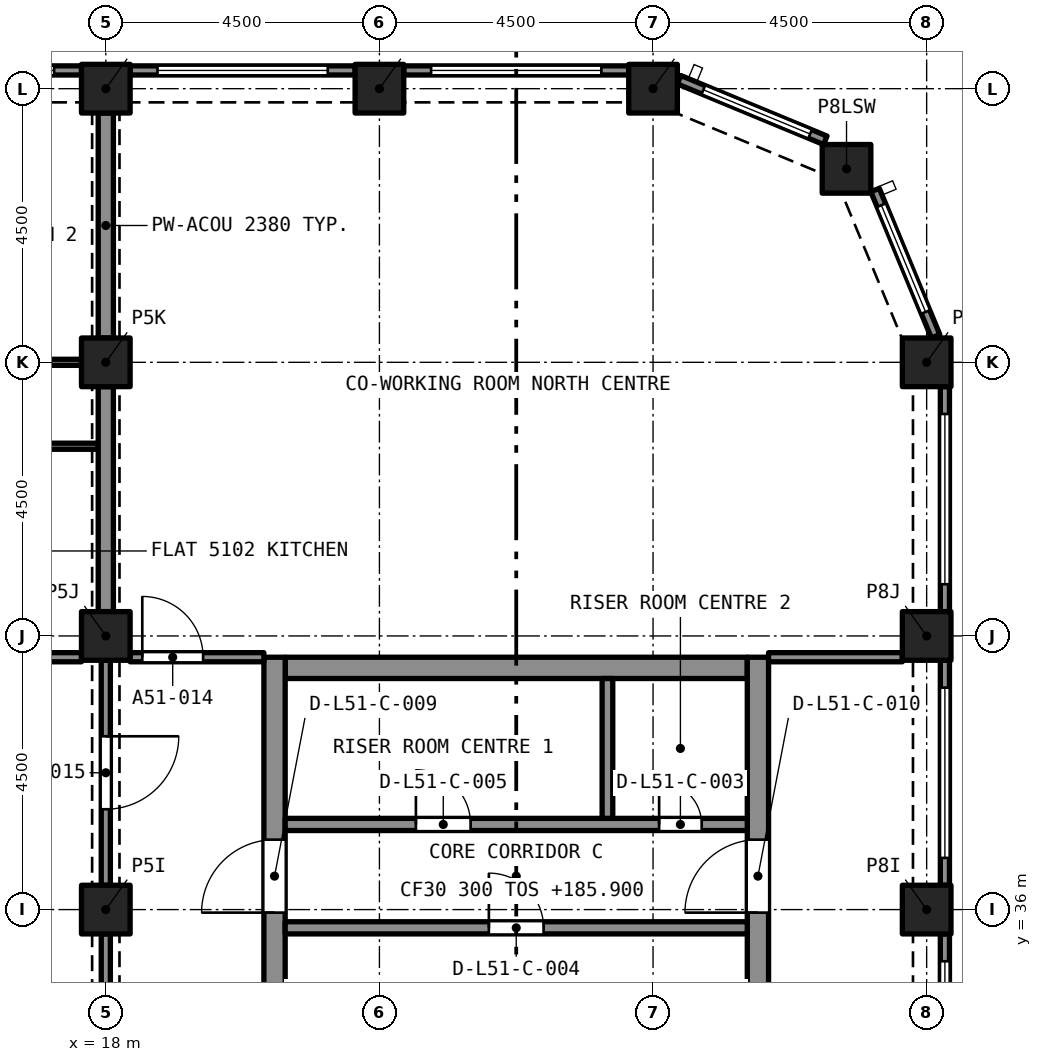
"""IFC4 building model, lengths in metres.
Left out: names, types, materials, properties, quantities, classifications, styles, units other than length and angle.
Written with IfcOpenShell. Run it as: python <this file> out.ifc"""

import sys

from ifc_helpers import new_model, si_unit, direction, frame, frame_2d, origin, origin_2d, place, context, subcontext, project, spatial, rectangle, extrude, element, fill, save


model = new_model("IFC4")
c1 = context("Model", 3, precision=1e-05, world=origin(), true_north=direction((0.0, 1.0)))
c2 = subcontext(c1, "Body", "Model", "MODEL_VIEW")
j1 = project(units=[si_unit("LENGTHUNIT", "METRE"), si_unit("PLANEANGLEUNIT", "RADIAN")], contexts=[c1])
p1 = place(None, origin())
s1 = spatial("IfcSite", under=j1, at=p1, CompositionType="ELEMENT")
p2 = place(p1, origin())
s2 = spatial("IfcBuilding", under=s1, at=p2, CompositionType="ELEMENT")
p3 = place(p2, frame((0.0, 0.0, 185.9)))
s3 = spatial("IfcBuildingStorey", under=s2, at=p3, CompositionType="ELEMENT", Elevation=185.9)
for number, where, z_axis, x_axis in (
    (1, (18.0, 36.0, 0.0), (0.0, 0.0, 1.0), (1.0, 0.0, 0.0)),
    (2, (31.5, 36.0, 0.0), (0.0, 0.0, 1.0), (1.0, 0.0, 0.0)),
    (3, (18.0, 40.5, 0.0), (0.0, 0.0, 1.0), (1.0, 0.0, 0.0)),
    (4, (31.5, 40.5, 0.0), (0.0, 0.0, 1.0), (1.0, 0.0, 0.0)),
    (5, (18.0, 45.0, 0.0), (0.0, 0.0, 1.0), (1.0, 0.0, 0.0)),
    (6, (31.5, 45.0, 0.0), (0.0, 0.0, 1.0), (1.0, 0.0, 0.0)),
    (7, (30.182, 48.182, 0.0), (0.0, 0.0, 1.0), (1.0, 0.0, 0.0)),
    (8, (18.0, 49.5, 0.0), (0.0, 0.0, 1.0), (1.0, 0.0, 0.0)),
    (9, (22.5, 49.5, 0.0), (0.0, 0.0, 1.0), (1.0, 0.0, 0.0)),
    (10, (27.0, 49.5, 0.0), (0.0, 0.0, 1.0), (1.0, 0.0, 0.0)),
):
    element("IfcColumn", number, at=place(p3, frame(where, z_axis=z_axis, x_axis=x_axis)), inside=s3, PredefinedType="COLUMN", context=c2, shape_type="SweptSolid", body=[
        extrude(rectangle(XDim=0.8, YDim=0.8, at=origin_2d()), origin(), (0.0, 0.0, 1.0), 3.2),
    ])
p4 = place(p3, frame((20.95, 39.975, 0.0), z_axis=(0.0, 0.0, 1.0), x_axis=(1.0, 0.0, 0.0)))
e11 = element("IfcWall", 11, at=p4, inside=s3, PredefinedType="SOLIDWALL", context=c2, shape_type="SweptSolid", body=[
    extrude(rectangle(XDim=7.6, YDim=0.35, at=frame_2d((3.8, 0.0))), origin(), (0.0, 0.0, 1.0), 3.2),
])
p5 = place(p3, frame((20.775, 27.35, 0.0), z_axis=(0.0, 0.0, 1.0), x_axis=(0.0, 1.0, 0.0)))
e12 = element("IfcWall", 12, at=p5, inside=s3, PredefinedType="SOLIDWALL", context=c2, shape_type="SweptSolid", body=[
    extrude(rectangle(XDim=12.8, YDim=0.35, at=frame_2d((6.4, 0.0))), origin(), (0.0, 0.0, 1.0), 3.2),
])
p6 = place(p5, frame((8.6, 0.0, 0.0)))
e13 = element("IfcOpeningElement", 13, at=p6, cuts=e12, PredefinedType="OPENING", context=c2, shape_type="SweptSolid", body=[
    extrude(rectangle(XDim=1.2, YDim=2.1, at=frame_2d((0.6, 1.05))), frame((0.0, 0.185, 0.0), z_axis=(0.0, -1.0, 0.0), x_axis=(1.0, 0.0, 0.0)), (0.0, 0.0, 1.0), 0.37),
])
p7 = place(p3, frame((28.725, 27.35, 0.0), z_axis=(0.0, 0.0, 1.0), x_axis=(0.0, 1.0, 0.0)))
e14 = element("IfcWall", 14, at=p7, inside=s3, PredefinedType="SOLIDWALL", context=c2, shape_type="SweptSolid", body=[
    extrude(rectangle(XDim=12.8, YDim=0.35, at=frame_2d((6.4, 0.0))), origin(), (0.0, 0.0, 1.0), 3.2),
])
p8 = place(p7, frame((8.6, 0.0, 0.0)))
e15 = element("IfcOpeningElement", 15, at=p8, cuts=e14, PredefinedType="OPENING", context=c2, shape_type="SweptSolid", body=[
    extrude(rectangle(XDim=1.2, YDim=2.1, at=frame_2d((0.6, 1.05))), frame((0.0, 0.185, 0.0), z_axis=(0.0, -1.0, 0.0), x_axis=(1.0, 0.0, 0.0)), (0.0, 0.0, 1.0), 0.37),
])
p9 = place(p3, frame((31.8, 35.6, 0.0), z_axis=(0.0, 0.0, 1.0), x_axis=(0.0, -1.0, 0.0)))
e16 = element("IfcWall", 16, at=p9, inside=s3, PredefinedType="SOLIDWALL", context=c2, shape_type="SweptSolid", body=[
    extrude(rectangle(XDim=3.7, YDim=0.15, at=frame_2d((1.85, 0.0))), origin(), (0.0, 0.0, 1.0), 3.2),
])
p10 = place(p9, frame((0.45, 0.0, 0.45)))
e17 = element("IfcOpeningElement", 17, at=p10, cuts=e16, PredefinedType="OPENING", context=c2, shape_type="SweptSolid", body=[
    extrude(rectangle(XDim=2.8, YDim=1.95, at=frame_2d((1.4, 0.975))), frame((0.0, 0.085, 0.0), z_axis=(0.0, -1.0, 0.0), x_axis=(1.0, 0.0, 0.0)), (0.0, 0.0, 1.0), 0.17),
])
p11 = place(p3, frame((31.8, 40.1, 0.0), z_axis=(0.0, 0.0, 1.0), x_axis=(0.0, -1.0, 0.0)))
e18 = element("IfcWall", 18, at=p11, inside=s3, PredefinedType="SOLIDWALL", context=c2, shape_type="SweptSolid", body=[
    extrude(rectangle(XDim=3.7, YDim=0.15, at=frame_2d((1.85, 0.0))), origin(), (0.0, 0.0, 1.0), 3.2),
])
p12 = place(p11, frame((0.45, 0.0, 0.45)))
e19 = element("IfcOpeningElement", 19, at=p12, cuts=e18, PredefinedType="OPENING", context=c2, shape_type="SweptSolid", body=[
    extrude(rectangle(XDim=2.8, YDim=1.95, at=frame_2d((1.4, 0.975))), frame((0.0, 0.085, 0.0), z_axis=(0.0, -1.0, 0.0), x_axis=(1.0, 0.0, 0.0)), (0.0, 0.0, 1.0), 0.17),
])
p13 = place(p3, frame((31.8, 44.6, 0.0), z_axis=(0.0, 0.0, 1.0), x_axis=(0.0, -1.0, 0.0)))
e20 = element("IfcWall", 20, at=p13, inside=s3, PredefinedType="SOLIDWALL", context=c2, shape_type="SweptSolid", body=[
    extrude(rectangle(XDim=3.7, YDim=0.15, at=frame_2d((1.85, 0.0))), origin(), (0.0, 0.0, 1.0), 3.2),
])
p14 = place(p13, frame((0.45, 0.0, 0.45)))
e21 = element("IfcOpeningElement", 21, at=p14, cuts=e20, PredefinedType="OPENING", context=c2, shape_type="SweptSolid", body=[
    extrude(rectangle(XDim=2.8, YDim=1.95, at=frame_2d((1.4, 0.975))), frame((0.0, 0.085, 0.0), z_axis=(0.0, -1.0, 0.0), x_axis=(1.0, 0.0, 0.0)), (0.0, 0.0, 1.0), 0.17),
])
p15 = place(p3, frame((30.651, 47.833, 0.0), z_axis=(0.0, 0.0, 1.0), x_axis=(0.382669406082, -0.923885342263, 0.0)))
e22 = element("IfcWall", 22, at=p15, inside=s3, PredefinedType="SOLIDWALL", context=c2, shape_type="SweptSolid", body=[
    extrude(rectangle(XDim=2.602, YDim=0.15, at=frame_2d((1.301, 0.0))), origin(), (0.0, 0.0, 1.0), 3.2),
])
p16 = place(p15, frame((0.27, 0.0, 0.45)))
e23 = element("IfcOpeningElement", 23, at=p16, cuts=e22, PredefinedType="OPENING", context=c2, shape_type="SweptSolid", body=[
    extrude(rectangle(XDim=1.9, YDim=1.95, at=frame_2d((0.95, 0.975))), frame((0.0, 0.085, 0.0), z_axis=(0.0, -1.0, 0.0), x_axis=(1.0, 0.0, 0.0)), (0.0, 0.0, 1.0), 0.17),
])
p17 = place(p3, frame((27.429, 49.647, 0.0), z_axis=(0.0, 0.0, 1.0), x_axis=(0.923885342263, -0.382669406082, 0.0)))
e24 = element("IfcWall", 24, at=p17, inside=s3, PredefinedType="SOLIDWALL", context=c2, shape_type="SweptSolid", body=[
    extrude(rectangle(XDim=2.602, YDim=0.15, at=frame_2d((1.301, 0.0))), origin(), (0.0, 0.0, 1.0), 3.2),
])
p18 = place(p17, frame((0.432, 0.0, 0.45)))
e25 = element("IfcOpeningElement", 25, at=p18, cuts=e24, PredefinedType="OPENING", context=c2, shape_type="SweptSolid", body=[
    extrude(rectangle(XDim=1.9, YDim=1.95, at=frame_2d((0.95, 0.975))), frame((0.0, 0.085, 0.0), z_axis=(0.0, -1.0, 0.0), x_axis=(1.0, 0.0, 0.0)), (0.0, 0.0, 1.0), 0.17),
])
p19 = place(p3, frame((22.9, 49.8, 0.0), z_axis=(0.0, 0.0, 1.0), x_axis=(1.0, 0.0, 0.0)))
e26 = element("IfcWall", 26, at=p19, inside=s3, PredefinedType="SOLIDWALL", context=c2, shape_type="SweptSolid", body=[
    extrude(rectangle(XDim=3.7, YDim=0.15, at=frame_2d((1.85, 0.0))), origin(), (0.0, 0.0, 1.0), 3.2),
])
p20 = place(p19, frame((0.45, 0.0, 0.45)))
e27 = element("IfcOpeningElement", 27, at=p20, cuts=e26, PredefinedType="OPENING", context=c2, shape_type="SweptSolid", body=[
    extrude(rectangle(XDim=2.8, YDim=1.95, at=frame_2d((1.4, 0.975))), frame((0.0, 0.085, 0.0), z_axis=(0.0, -1.0, 0.0), x_axis=(1.0, 0.0, 0.0)), (0.0, 0.0, 1.0), 0.17),
])
p21 = place(p3, frame((18.4, 49.8, 0.0), z_axis=(0.0, 0.0, 1.0), x_axis=(1.0, 0.0, 0.0)))
e28 = element("IfcWall", 28, at=p21, inside=s3, PredefinedType="SOLIDWALL", context=c2, shape_type="SweptSolid", body=[
    extrude(rectangle(XDim=3.7, YDim=0.15, at=frame_2d((1.85, 0.0))), origin(), (0.0, 0.0, 1.0), 3.2),
])
p22 = place(p21, frame((0.45, 0.0, 0.45)))
e29 = element("IfcOpeningElement", 29, at=p22, cuts=e28, PredefinedType="OPENING", context=c2, shape_type="SweptSolid", body=[
    extrude(rectangle(XDim=2.8, YDim=1.95, at=frame_2d((1.4, 0.975))), frame((0.0, 0.085, 0.0), z_axis=(0.0, -1.0, 0.0), x_axis=(1.0, 0.0, 0.0)), (0.0, 0.0, 1.0), 0.17),
])
p23 = place(p3, frame((13.9, 49.8, 0.0), z_axis=(0.0, 0.0, 1.0), x_axis=(1.0, 0.0, 0.0)))
e30 = element("IfcWall", 30, at=p23, inside=s3, PredefinedType="SOLIDWALL", context=c2, shape_type="SweptSolid", body=[
    extrude(rectangle(XDim=3.7, YDim=0.15, at=frame_2d((1.85, 0.0))), origin(), (0.0, 0.0, 1.0), 3.2),
])
p24 = place(p23, frame((0.45, 0.0, 0.45)))
e31 = element("IfcOpeningElement", 31, at=p24, cuts=e30, PredefinedType="OPENING", context=c2, shape_type="SweptSolid", body=[
    extrude(rectangle(XDim=2.8, YDim=1.95, at=frame_2d((1.4, 0.975))), frame((0.0, 0.085, 0.0), z_axis=(0.0, -1.0, 0.0), x_axis=(1.0, 0.0, 0.0)), (0.0, 0.0, 1.0), 0.17),
])
p25 = place(p3, frame((13.15, 40.15, 0.0), z_axis=(0.0, 0.0, 1.0), x_axis=(1.0, 0.0, 0.0)))
e32 = element("IfcWall", 32, at=p25, inside=s3, PredefinedType="PARTITIONING", context=c2, shape_type="SweptSolid", body=[
    extrude(rectangle(XDim=4.45, YDim=0.15, at=frame_2d((2.225, 0.0))), origin(), (0.0, 0.0, 1.0), 2.9),
])
p26 = place(p3, frame((13.5, 45.0, 0.0), z_axis=(0.0, 0.0, 1.0), x_axis=(1.0, 0.0, 0.0)))
e33 = element("IfcWall", 33, at=p26, inside=s3, PredefinedType="PARTITIONING", context=c2, shape_type="SweptSolid", body=[
    extrude(rectangle(XDim=4.1, YDim=0.1, at=frame_2d((2.05, 0.0))), origin(), (0.0, 0.0, 1.0), 2.9),
])
p27 = place(p26, frame((1.8, 0.0, 0.0)))
e34 = element("IfcOpeningElement", 34, at=p27, cuts=e33, PredefinedType="OPENING", context=c2, shape_type="SweptSolid", body=[
    extrude(rectangle(XDim=0.9, YDim=2.1, at=frame_2d((0.45, 1.05))), frame((0.0, 0.06, 0.0), z_axis=(0.0, -1.0, 0.0), x_axis=(1.0, 0.0, 0.0)), (0.0, 0.0, 1.0), 0.12),
])
p28 = place(p3, frame((18.0, 45.4, 0.0), z_axis=(0.0, 0.0, 1.0), x_axis=(0.0, 1.0, 0.0)))
e35 = element("IfcWall", 35, at=p28, inside=s3, PredefinedType="PARTITIONING", context=c2, shape_type="SweptSolid", body=[
    extrude(rectangle(XDim=3.7, YDim=0.25, at=frame_2d((1.85, 0.0))), origin(), (0.0, 0.0, 1.0), 2.38),
])
p29 = place(p3, frame((17.875, 43.62, 0.0), z_axis=(0.0, 0.0, 1.0), x_axis=(-1.0, 0.0, 0.0)))
e36 = element("IfcWall", 36, at=p29, inside=s3, PredefinedType="PARTITIONING", context=c2, shape_type="SweptSolid", body=[
    extrude(rectangle(XDim=3.525, YDim=0.1, at=frame_2d((1.762, 0.0))), origin(), (0.0, 0.0, 1.0), 2.9),
])
p30 = place(p29, frame((1.25, 0.0, 0.0)))
e37 = element("IfcOpeningElement", 37, at=p30, cuts=e36, PredefinedType="OPENING", context=c2, shape_type="SweptSolid", body=[
    extrude(rectangle(XDim=0.9, YDim=2.1, at=frame_2d((0.45, 1.05))), frame((0.0, 0.06, 0.0), z_axis=(0.0, -1.0, 0.0), x_axis=(1.0, 0.0, 0.0)), (0.0, 0.0, 1.0), 0.12),
])
p31 = place(p3, frame((18.0, 40.9, 0.0), z_axis=(0.0, 0.0, 1.0), x_axis=(0.0, 1.0, 0.0)))
e38 = element("IfcWall", 38, at=p31, inside=s3, PredefinedType="PARTITIONING", context=c2, shape_type="SweptSolid", body=[
    extrude(rectangle(XDim=3.7, YDim=0.25, at=frame_2d((1.85, 0.0))), origin(), (0.0, 0.0, 1.0), 2.38),
])
p32 = place(p3, frame((18.4, 40.15, 0.0), z_axis=(0.0, 0.0, 1.0), x_axis=(1.0, 0.0, 0.0)))
e39 = element("IfcWall", 39, at=p32, inside=s3, PredefinedType="PARTITIONING", context=c2, shape_type="SweptSolid", body=[
    extrude(rectangle(XDim=2.2, YDim=0.15, at=frame_2d((1.1, 0.0))), origin(), (0.0, 0.0, 1.0), 2.75),
])
p33 = place(p32, frame((0.2, 0.0, 0.0)))
e40 = element("IfcOpeningElement", 40, at=p33, cuts=e39, PredefinedType="OPENING", context=c2, shape_type="SweptSolid", body=[
    extrude(rectangle(XDim=1.0, YDim=2.1, at=frame_2d((0.5, 1.05))), frame((0.0, 0.085, 0.0), z_axis=(0.0, -1.0, 0.0), x_axis=(1.0, 0.0, 0.0)), (0.0, 0.0, 1.0), 0.17),
])
p34 = place(p3, frame((28.9, 40.15, 0.0), z_axis=(0.0, 0.0, 1.0), x_axis=(1.0, 0.0, 0.0)))
e41 = element("IfcWall", 41, at=p34, inside=s3, PredefinedType="PARTITIONING", context=c2, shape_type="SweptSolid", body=[
    extrude(rectangle(XDim=2.2, YDim=0.15, at=frame_2d((1.1, 0.0))), origin(), (0.0, 0.0, 1.0), 2.75),
])
p35 = place(p3, frame((18.0, 31.9, 0.0), z_axis=(0.0, 0.0, 1.0), x_axis=(0.0, 1.0, 0.0)))
e42 = element("IfcWall", 42, at=p35, inside=s3, PredefinedType="PARTITIONING", context=c2, shape_type="SweptSolid", body=[
    extrude(rectangle(XDim=3.7, YDim=0.15, at=frame_2d((1.85, 0.0))), origin(), (0.0, 0.0, 1.0), 2.38),
])
p36 = place(p3, frame((18.0, 40.1, 0.0), z_axis=(0.0, 0.0, 1.0), x_axis=(0.0, -1.0, 0.0)))
e43 = element("IfcWall", 43, at=p36, inside=s3, PredefinedType="PARTITIONING", context=c2, shape_type="SweptSolid", body=[
    extrude(rectangle(XDim=3.7, YDim=0.15, at=frame_2d((1.85, 0.0))), origin(), (0.0, 0.0, 1.0), 2.38),
])
p37 = place(p36, frame((1.25, 0.0, 0.0)))
e44 = element("IfcOpeningElement", 44, at=p37, cuts=e43, PredefinedType="OPENING", context=c2, shape_type="SweptSolid", body=[
    extrude(rectangle(XDim=1.2, YDim=2.1, at=frame_2d((0.6, 1.05))), frame((0.0, 0.085, 0.0), z_axis=(0.0, -1.0, 0.0), x_axis=(1.0, 0.0, 0.0)), (0.0, 0.0, 1.0), 0.17),
])
p38 = place(p3, frame((20.95, 35.7, 0.0), z_axis=(0.0, 0.0, 1.0), x_axis=(1.0, 0.0, 0.0)))
e45 = element("IfcWall", 45, at=p38, inside=s3, PredefinedType="SOLIDWALL", context=c2, shape_type="SweptSolid", body=[
    extrude(rectangle(XDim=7.6, YDim=0.2, at=frame_2d((3.8, 0.0))), origin(), (0.0, 0.0, 1.0), 2.9),
])
p39 = place(p38, frame((3.35, 0.0, 0.0)))
e46 = element("IfcOpeningElement", 46, at=p39, cuts=e45, PredefinedType="OPENING", context=c2, shape_type="SweptSolid", body=[
    extrude(rectangle(XDim=0.9, YDim=2.1, at=frame_2d((0.45, 1.05))), frame((0.0, 0.11, 0.0), z_axis=(0.0, -1.0, 0.0), x_axis=(1.0, 0.0, 0.0)), (0.0, 0.0, 1.0), 0.22),
])
p40 = place(p3, frame((20.95, 37.4, 0.0), z_axis=(0.0, 0.0, 1.0), x_axis=(1.0, 0.0, 0.0)))
e47 = element("IfcWall", 47, at=p40, inside=s3, PredefinedType="SOLIDWALL", context=c2, shape_type="SweptSolid", body=[
    extrude(rectangle(XDim=7.6, YDim=0.2, at=frame_2d((3.8, 0.0))), origin(), (0.0, 0.0, 1.0), 2.9),
])
p41 = place(p40, frame((6.15, 0.0, 0.0)))
e48 = element("IfcOpeningElement", 48, at=p41, cuts=e47, PredefinedType="OPENING", context=c2, shape_type="SweptSolid", body=[
    extrude(rectangle(XDim=0.7, YDim=2.1, at=frame_2d((0.35, 1.05))), frame((0.0, 0.11, 0.0), z_axis=(0.0, -1.0, 0.0), x_axis=(1.0, 0.0, 0.0)), (0.0, 0.0, 1.0), 0.22),
])
p42 = place(p40, frame((2.15, 0.0, 0.0)))
e49 = element("IfcOpeningElement", 49, at=p42, cuts=e47, PredefinedType="OPENING", context=c2, shape_type="SweptSolid", body=[
    extrude(rectangle(XDim=0.9, YDim=2.1, at=frame_2d((0.45, 1.05))), frame((0.0, 0.11, 0.0), z_axis=(0.0, -1.0, 0.0), x_axis=(1.0, 0.0, 0.0)), (0.0, 0.0, 1.0), 0.22),
])
p43 = place(p3, frame((26.25, 37.5, 0.0), z_axis=(0.0, 0.0, 1.0), x_axis=(0.0, 1.0, 0.0)))
e50 = element("IfcWall", 50, at=p43, inside=s3, PredefinedType="SOLIDWALL", context=c2, shape_type="SweptSolid", body=[
    extrude(rectangle(XDim=2.3, YDim=0.175, at=frame_2d((1.15, 0.0))), origin(), (0.0, 0.0, 1.0), 2.9),
])
p44 = place(p10, origin())
e51 = element("IfcWindow", 51, at=p44, inside=s3, PartitioningType="SINGLE_PANEL", PredefinedType="WINDOW", context=c2, shape_type="SweptSolid", body=[
    extrude(rectangle(XDim=2.8, YDim=1.95, at=frame_2d((1.4, 0.975))), frame((0.0, 0.03, 0.0), z_axis=(0.0, -1.0, 0.0), x_axis=(1.0, 0.0, 0.0)), (0.0, 0.0, 1.0), 0.06),
])
fill(e17, e51)
p45 = place(p12, origin())
e52 = element("IfcWindow", 52, at=p45, inside=s3, PartitioningType="SINGLE_PANEL", PredefinedType="WINDOW", context=c2, shape_type="SweptSolid", body=[
    extrude(rectangle(XDim=2.8, YDim=1.95, at=frame_2d((1.4, 0.975))), frame((0.0, 0.03, 0.0), z_axis=(0.0, -1.0, 0.0), x_axis=(1.0, 0.0, 0.0)), (0.0, 0.0, 1.0), 0.06),
])
fill(e19, e52)
p46 = place(p14, origin())
e53 = element("IfcWindow", 53, at=p46, inside=s3, PartitioningType="SINGLE_PANEL", PredefinedType="WINDOW", context=c2, shape_type="SweptSolid", body=[
    extrude(rectangle(XDim=2.8, YDim=1.95, at=frame_2d((1.4, 0.975))), frame((0.0, 0.03, 0.0), z_axis=(0.0, -1.0, 0.0), x_axis=(1.0, 0.0, 0.0)), (0.0, 0.0, 1.0), 0.06),
])
fill(e21, e53)
p47 = place(p16, origin())
e54 = element("IfcWindow", 54, at=p47, inside=s3, PartitioningType="SINGLE_PANEL", PredefinedType="WINDOW", context=c2, shape_type="SweptSolid", body=[
    extrude(rectangle(XDim=1.9, YDim=1.95, at=frame_2d((0.95, 0.975))), frame((0.0, 0.03, 0.0), z_axis=(0.0, -1.0, 0.0), x_axis=(1.0, 0.0, 0.0)), (0.0, 0.0, 1.0), 0.06),
])
fill(e23, e54)
p48 = place(p18, origin())
e55 = element("IfcWindow", 55, at=p48, inside=s3, PartitioningType="SINGLE_PANEL", PredefinedType="WINDOW", context=c2, shape_type="SweptSolid", body=[
    extrude(rectangle(XDim=1.9, YDim=1.95, at=frame_2d((0.95, 0.975))), frame((0.0, 0.03, 0.0), z_axis=(0.0, -1.0, 0.0), x_axis=(1.0, 0.0, 0.0)), (0.0, 0.0, 1.0), 0.06),
])
fill(e25, e55)
p49 = place(p20, origin())
e56 = element("IfcWindow", 56, at=p49, inside=s3, PartitioningType="SINGLE_PANEL", PredefinedType="WINDOW", context=c2, shape_type="SweptSolid", body=[
    extrude(rectangle(XDim=2.8, YDim=1.95, at=frame_2d((1.4, 0.975))), frame((0.0, 0.03, 0.0), z_axis=(0.0, -1.0, 0.0), x_axis=(1.0, 0.0, 0.0)), (0.0, 0.0, 1.0), 0.06),
])
fill(e27, e56)
p50 = place(p22, origin())
e57 = element("IfcWindow", 57, at=p50, inside=s3, PartitioningType="SINGLE_PANEL", PredefinedType="WINDOW", context=c2, shape_type="SweptSolid", body=[
    extrude(rectangle(XDim=2.8, YDim=1.95, at=frame_2d((1.4, 0.975))), frame((0.0, 0.03, 0.0), z_axis=(0.0, -1.0, 0.0), x_axis=(1.0, 0.0, 0.0)), (0.0, 0.0, 1.0), 0.06),
])
fill(e29, e57)
p51 = place(p24, origin())
e58 = element("IfcWindow", 58, at=p51, inside=s3, PartitioningType="SINGLE_PANEL", PredefinedType="WINDOW", context=c2, shape_type="SweptSolid", body=[
    extrude(rectangle(XDim=2.8, YDim=1.95, at=frame_2d((1.4, 0.975))), frame((0.0, 0.03, 0.0), z_axis=(0.0, -1.0, 0.0), x_axis=(1.0, 0.0, 0.0)), (0.0, 0.0, 1.0), 0.06),
])
fill(e31, e58)
p52 = place(p33, origin())
e59 = element("IfcDoor", 59, at=p52, inside=s3, OperationType="SINGLE_SWING_LEFT", PredefinedType="DOOR", context=c2, shape_type="SweptSolid", body=[
    extrude(rectangle(XDim=1.0, YDim=2.1, at=frame_2d((0.5, 1.05))), frame((0.0, 0.025, 0.0), z_axis=(0.0, -1.0, 0.0), x_axis=(1.0, 0.0, 0.0)), (0.0, 0.0, 1.0), 0.05),
])
fill(e40, e59)
p53 = place(p37, origin())
e60 = element("IfcDoor", 60, at=p53, inside=s3, OperationType="SINGLE_SWING_LEFT", PredefinedType="DOOR", context=c2, shape_type="SweptSolid", body=[
    extrude(rectangle(XDim=1.2, YDim=2.1, at=frame_2d((0.6, 1.05))), frame((0.0, 0.025, 0.0), z_axis=(0.0, -1.0, 0.0), x_axis=(1.0, 0.0, 0.0)), (0.0, 0.0, 1.0), 0.05),
])
fill(e44, e60)
p54 = place(p41, origin())
e61 = element("IfcDoor", 61, at=p54, inside=s3, OperationType="SINGLE_SWING_LEFT", PredefinedType="DOOR", context=c2, shape_type="SweptSolid", body=[
    extrude(rectangle(XDim=0.7, YDim=2.1, at=frame_2d((0.35, 1.05))), frame((0.0, 0.025, 0.0), z_axis=(0.0, -1.0, 0.0), x_axis=(1.0, 0.0, 0.0)), (0.0, 0.0, 1.0), 0.05),
])
fill(e48, e61)
p55 = place(p39, origin())
e62 = element("IfcDoor", 62, at=p55, inside=s3, OperationType="SINGLE_SWING_LEFT", PredefinedType="DOOR", context=c2, shape_type="SweptSolid", body=[
    extrude(rectangle(XDim=0.9, YDim=2.1, at=frame_2d((0.45, 1.05))), frame((0.0, 0.025, 0.0), z_axis=(0.0, -1.0, 0.0), x_axis=(1.0, 0.0, 0.0)), (0.0, 0.0, 1.0), 0.05),
])
fill(e46, e62)
p56 = place(p42, origin())
e63 = element("IfcDoor", 63, at=p56, inside=s3, OperationType="SINGLE_SWING_LEFT", PredefinedType="DOOR", context=c2, shape_type="SweptSolid", body=[
    extrude(rectangle(XDim=0.9, YDim=2.1, at=frame_2d((0.45, 1.05))), frame((0.0, 0.025, 0.0), z_axis=(0.0, -1.0, 0.0), x_axis=(1.0, 0.0, 0.0)), (0.0, 0.0, 1.0), 0.05),
])
fill(e49, e63)
p57 = place(p6, origin())
e64 = element("IfcDoor", 64, at=p57, inside=s3, OperationType="SINGLE_SWING_LEFT", PredefinedType="DOOR", context=c2, shape_type="SweptSolid", body=[
    extrude(rectangle(XDim=1.2, YDim=2.1, at=frame_2d((0.6, 1.05))), frame((0.0, 0.025, 0.0), z_axis=(0.0, -1.0, 0.0), x_axis=(1.0, 0.0, 0.0)), (0.0, 0.0, 1.0), 0.05),
])
fill(e13, e64)
p58 = place(p8, origin())
e65 = element("IfcDoor", 65, at=p58, inside=s3, OperationType="SINGLE_SWING_LEFT", PredefinedType="DOOR", context=c2, shape_type="SweptSolid", body=[
    extrude(rectangle(XDim=1.2, YDim=2.1, at=frame_2d((0.6, 1.05))), frame((0.0, 0.025, 0.0), z_axis=(0.0, -1.0, 0.0), x_axis=(1.0, 0.0, 0.0)), (0.0, 0.0, 1.0), 0.05),
])
fill(e15, e65)
save(model, sys.argv[1])
